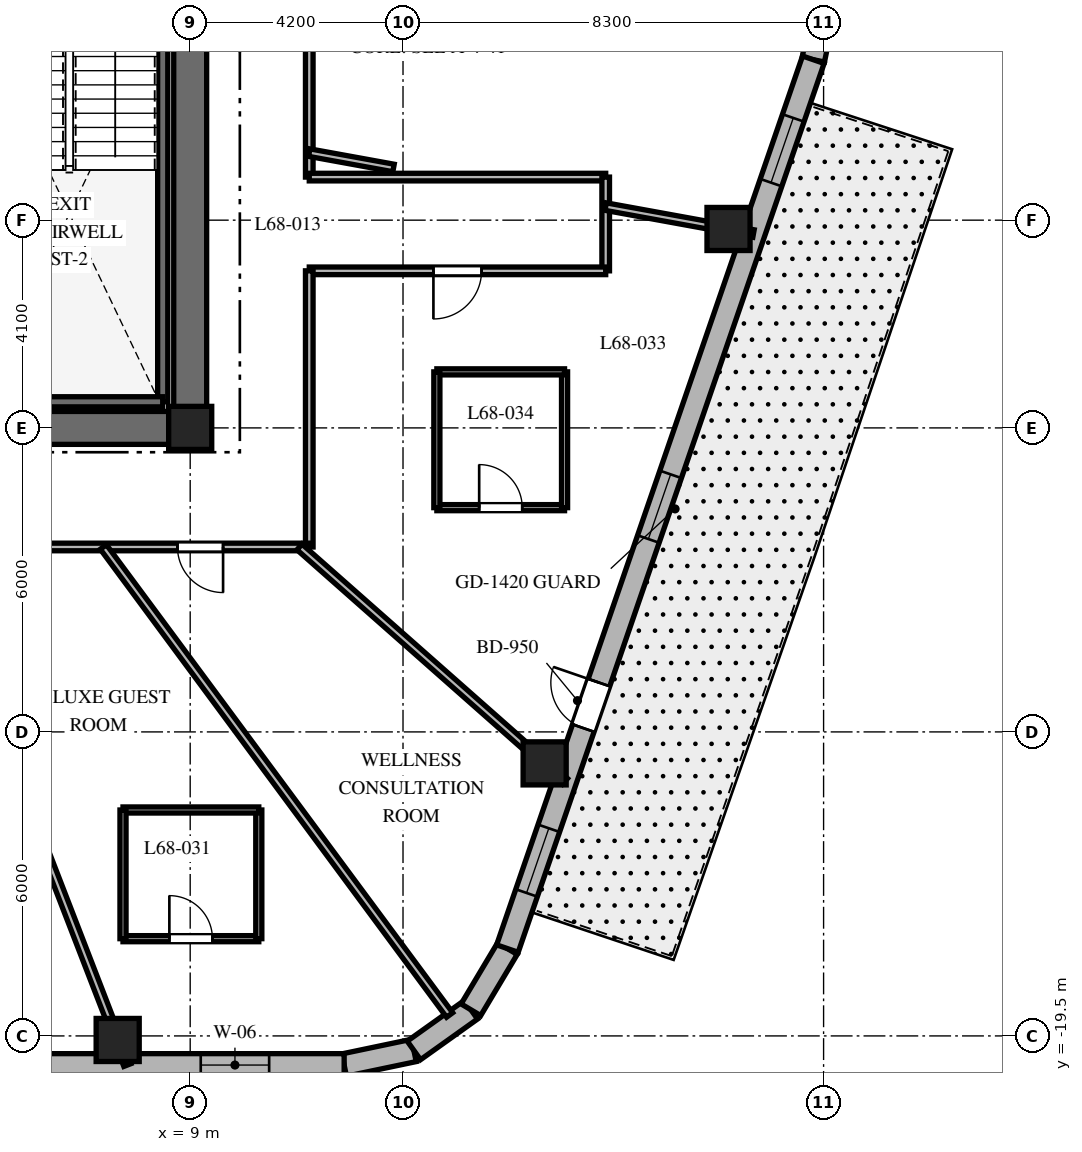
"""IFC4 building model, lengths in metres.
Left out: names, types, materials, properties, quantities, classifications, styles, units other than length and angle.
Written with IfcOpenShell. Run it as: python <this file> out.ifc"""

import sys

from ifc_helpers import new_model, si_unit, direction, frame, frame_2d, origin, origin_2d, place, context, subcontext, project, spatial, rectangle, extrude, element, fill, save


model = new_model("IFC4")
c1 = context("Model", 3, precision=1e-05, world=origin(), true_north=direction((0.0, 1.0)))
c2 = subcontext(c1, "Body", "Model", "MODEL_VIEW")
j1 = project(units=[si_unit("LENGTHUNIT", "METRE"), si_unit("PLANEANGLEUNIT", "RADIAN")], contexts=[c1])
p1 = place(None, origin())
s1 = spatial("IfcSite", under=j1, at=p1, CompositionType="ELEMENT")
p2 = place(p1, origin())
s2 = spatial("IfcBuilding", under=s1, at=p2, CompositionType="ELEMENT")
p3 = place(p2, frame((0.0, 0.0, 273.0)))
s3 = spatial("IfcBuildingStorey", under=s2, at=p3, CompositionType="ELEMENT", Elevation=273.0)
p4 = place(p3, frame((-9.325, -7.5, 0.0), z_axis=(0.0, 0.0, 1.0), x_axis=(1.0, 0.0, 0.0)))
e1 = element("IfcWall", 1, at=p4, inside=s3, PredefinedType="SHEAR", context=c2, shape_type="SweptSolid", body=[
    extrude(rectangle(XDim=18.65, YDim=0.65, at=frame_2d((9.325, 0.0))), origin(), (0.0, 0.0, 1.0), 3.9),
])
p5 = place(p4, frame((9.375, 0.0, 0.0)))
e2 = element("IfcOpeningElement", 2, at=p5, cuts=e1, PredefinedType="OPENING", context=c2, shape_type="SweptSolid", body=[
    extrude(rectangle(XDim=1.0, YDim=2.15, at=frame_2d((0.5, 1.075))), frame((0.0, 0.335, 0.0), z_axis=(0.0, -1.0, 0.0), x_axis=(1.0, 0.0, 0.0)), (0.0, 0.0, 1.0), 0.67),
])
p6 = place(p3, frame((9.0, -7.175, 0.0), z_axis=(0.0, 0.0, 1.0), x_axis=(0.0, 1.0, 0.0)))
e3 = element("IfcWall", 3, at=p6, inside=s3, PredefinedType="SHEAR", context=c2, shape_type="SweptSolid", body=[
    extrude(rectangle(XDim=14.35, YDim=0.65, at=frame_2d((7.175, 0.0))), origin(), (0.0, 0.0, 1.0), 3.9),
])
p7 = place(p6, frame((10.3, 0.0, 0.0)))
e4 = element("IfcOpeningElement", 4, at=p7, cuts=e3, PredefinedType="OPENING", context=c2, shape_type="SweptSolid", body=[
    extrude(rectangle(XDim=1.05, YDim=2.15, at=frame_2d((0.525, 1.075))), frame((0.0, 0.335, 0.0), z_axis=(0.0, -1.0, 0.0), x_axis=(1.0, 0.0, 0.0)), (0.0, 0.0, 1.0), 0.67),
])
p8 = place(p3, frame((8.458, -6.985, 0.0), z_axis=(0.0, 0.0, 1.0), x_axis=(0.0, 1.0, 0.0)))
e5 = element("IfcWall", 5, at=p8, inside=s3, PredefinedType="SHEAR", context=c2, shape_type="SweptSolid", body=[
    extrude(rectangle(XDim=9.143, YDim=0.2, at=frame_2d((4.572, 0.0))), origin(), (0.0, 0.0, 1.0), 3.9),
])
p9 = place(p3, frame((4.772, -6.985, 0.0), z_axis=(0.0, 0.0, 1.0), x_axis=(1.0, 0.0, 0.0)))
e6 = element("IfcWall", 6, at=p9, inside=s3, PredefinedType="SHEAR", context=c2, shape_type="SweptSolid", body=[
    extrude(rectangle(XDim=3.686, YDim=0.2, at=frame_2d((1.843, 0.0))), origin(), (0.0, 0.0, 1.0), 3.9),
])
for number, where, z_axis, x_axis in (
    (7, (9.0, -7.5, 0.0), (0.0, 0.0, 1.0), (1.0, 0.0, 0.0)),
    (8, (7.569, -19.58, 0.0), (0.0, 0.0, 1.0), (1.0, 0.0, 0.0)),
    (9, (15.995, -14.121, 0.0), (0.0, 0.0, 1.0), (1.0, 0.0, 0.0)),
    (10, (19.624, -3.574, 0.0), (0.0, 0.0, 1.0), (1.0, 0.0, 0.0)),
):
    element("IfcColumn", number, at=place(p3, frame(where, z_axis=z_axis, x_axis=x_axis)), inside=s3, PredefinedType="COLUMN", context=c2, shape_type="SweptSolid", body=[
        extrude(rectangle(XDim=0.85, YDim=0.85, at=origin_2d()), origin(), (0.0, 0.0, 1.0), 3.9),
    ])
p10 = place(p3, frame((12.038, -20.075, 0.0), z_axis=(0.0, 0.0, 1.0), x_axis=(0.978750122553, 0.205056571711, 0.0)))
e11 = element("IfcWall", 11, at=p10, inside=s3, PredefinedType="SOLIDWALL", context=c2, shape_type="SweptSolid", body=[
    extrude(rectangle(XDim=1.406, YDim=0.45, at=frame_2d((0.703, 0.0))), origin(), (0.0, 0.0, 1.0), 3.6),
])
p11 = place(p3, frame((13.415, -19.787, 0.0), z_axis=(0.0, 0.0, 1.0), x_axis=(0.814055493997, 0.580787097561, 0.0)))
e12 = element("IfcWall", 12, at=p11, inside=s3, PredefinedType="SOLIDWALL", context=c2, shape_type="SweptSolid", body=[
    extrude(rectangle(XDim=1.383, YDim=0.45, at=frame_2d((0.691, 0.0))), origin(), (0.0, 0.0, 1.0), 3.6),
])
p12 = place(p3, frame((14.54, -18.984, 0.0), z_axis=(0.0, 0.0, 1.0), x_axis=(0.512374906623, 0.858761873317, 0.0)))
e13 = element("IfcWall", 13, at=p12, inside=s3, PredefinedType="SOLIDWALL", context=c2, shape_type="SweptSolid", body=[
    extrude(rectangle(XDim=1.406, YDim=0.45, at=frame_2d((0.703, 0.0))), origin(), (0.0, 0.0, 1.0), 3.6),
])
p13 = place(p3, frame((21.298, -0.233, 0.0), z_axis=(0.0, 0.0, 1.0), x_axis=(0.199158176661, 0.979967356941, 0.0)))
e14 = element("IfcWall", 14, at=p13, inside=s3, PredefinedType="SOLIDWALL", context=c2, shape_type="SweptSolid", body=[
    extrude(rectangle(XDim=0.895, YDim=0.45, at=frame_2d((0.447, 0.0))), origin(), (0.0, 0.0, 1.0), 3.6),
])
p14 = place(p3, frame((-10.379, -20.075, 0.0), z_axis=(0.0, 0.0, 1.0), x_axis=(1.0, 0.0, 0.0)))
e15 = element("IfcWall", 15, at=p14, inside=s3, PredefinedType="SOLIDWALL", context=c2, shape_type="SweptSolid", body=[
    extrude(rectangle(XDim=22.417, YDim=0.45, at=frame_2d((11.208, 0.0))), origin(), (0.0, 0.0, 1.0), 3.6),
])
p15 = place(p14, frame((1.48, 0.0, 0.8)))
e16 = element("IfcOpeningElement", 16, at=p15, cuts=e15, PredefinedType="OPENING", context=c2, shape_type="SweptSolid", body=[
    extrude(rectangle(XDim=1.35, YDim=1.75, at=frame_2d((0.675, 0.875))), frame((0.0, 0.235, 0.0), z_axis=(0.0, -1.0, 0.0), x_axis=(1.0, 0.0, 0.0)), (0.0, 0.0, 1.0), 0.47),
])
p16 = place(p14, frame((10.534, 0.0, 0.8)))
e17 = element("IfcOpeningElement", 17, at=p16, cuts=e15, PredefinedType="OPENING", context=c2, shape_type="SweptSolid", body=[
    extrude(rectangle(XDim=1.35, YDim=1.75, at=frame_2d((0.675, 0.875))), frame((0.0, 0.235, 0.0), z_axis=(0.0, -1.0, 0.0), x_axis=(1.0, 0.0, 0.0)), (0.0, 0.0, 1.0), 0.47),
])
p17 = place(p14, frame((19.587, 0.0, 0.8)))
e18 = element("IfcOpeningElement", 18, at=p17, cuts=e15, PredefinedType="OPENING", context=c2, shape_type="SweptSolid", body=[
    extrude(rectangle(XDim=1.35, YDim=1.75, at=frame_2d((0.675, 0.875))), frame((0.0, 0.235, 0.0), z_axis=(0.0, -1.0, 0.0), x_axis=(1.0, 0.0, 0.0)), (0.0, 0.0, 1.0), 0.47),
])
p18 = place(p3, frame((15.26, -17.776, 0.0), z_axis=(0.0, 0.0, 1.0), x_axis=(0.325407437101, 0.945573899745, 0.0)))
e19 = element("IfcWall", 19, at=p18, inside=s3, PredefinedType="SOLIDWALL", context=c2, shape_type="SweptSolid", body=[
    extrude(rectangle(XDim=18.552, YDim=0.45, at=frame_2d((9.276, 0.0))), origin(), (0.0, 0.0, 1.0), 3.6),
])
p19 = place(p18, frame((4.602, 0.0, 0.0)))
e20 = element("IfcOpeningElement", 20, at=p19, cuts=e19, PredefinedType="OPENING", context=c2, shape_type="SweptSolid", body=[
    extrude(rectangle(XDim=0.95, YDim=2.15, at=frame_2d((0.475, 1.075))), frame((0.0, 0.235, 0.0), z_axis=(0.0, -1.0, 0.0), x_axis=(1.0, 0.0, 0.0)), (0.0, 0.0, 1.0), 0.47),
])
p20 = place(p18, frame((1.161, 0.0, 0.8)))
e21 = element("IfcOpeningElement", 21, at=p20, cuts=e19, PredefinedType="OPENING", context=c2, shape_type="SweptSolid", body=[
    extrude(rectangle(XDim=1.35, YDim=1.75, at=frame_2d((0.675, 0.875))), frame((0.0, 0.235, 0.0), z_axis=(0.0, -1.0, 0.0), x_axis=(1.0, 0.0, 0.0)), (0.0, 0.0, 1.0), 0.47),
])
p21 = place(p18, frame((8.548, 0.0, 0.8)))
e22 = element("IfcOpeningElement", 22, at=p21, cuts=e19, PredefinedType="OPENING", context=c2, shape_type="SweptSolid", body=[
    extrude(rectangle(XDim=1.35, YDim=1.75, at=frame_2d((0.675, 0.875))), frame((0.0, 0.235, 0.0), z_axis=(0.0, -1.0, 0.0), x_axis=(1.0, 0.0, 0.0)), (0.0, 0.0, 1.0), 0.47),
])
p22 = place(p18, frame((15.987, 0.0, 0.8)))
e23 = element("IfcOpeningElement", 23, at=p22, cuts=e19, PredefinedType="OPENING", context=c2, shape_type="SweptSolid", body=[
    extrude(rectangle(XDim=1.35, YDim=1.75, at=frame_2d((0.675, 0.875))), frame((0.0, 0.235, 0.0), z_axis=(0.0, -1.0, 0.0), x_axis=(1.0, 0.0, 0.0)), (0.0, 0.0, 1.0), 0.47),
])
p23 = place(p3, frame((11.35, 9.85, 0.0), z_axis=(0.0, 0.0, 1.0), x_axis=(0.0, -1.0, 0.0)))
e24 = element("IfcWall", 24, at=p23, inside=s3, PredefinedType="PARTITIONING", context=c2, shape_type="SweptSolid", body=[
    extrude(rectangle(XDim=12.4, YDim=0.15, at=frame_2d((6.2, 0.0))), origin(), (0.0, 0.0, 1.0), 3.09),
])
p24 = place(p23, frame((2.998, 0.0, 0.0)))
e25 = element("IfcOpeningElement", 25, at=p24, cuts=e24, PredefinedType="OPENING", context=c2, shape_type="SweptSolid", body=[
    extrude(rectangle(XDim=0.95, YDim=2.03, at=frame_2d((0.475, 1.015))), frame((0.0, 0.085, 0.0), z_axis=(0.0, -1.0, 0.0), x_axis=(1.0, 0.0, 0.0)), (0.0, 0.0, 1.0), 0.17),
])
p25 = place(p23, frame((8.835, 0.0, 0.0)))
e26 = element("IfcOpeningElement", 26, at=p25, cuts=e24, PredefinedType="OPENING", context=c2, shape_type="SweptSolid", body=[
    extrude(rectangle(XDim=0.95, YDim=2.03, at=frame_2d((0.475, 1.015))), frame((0.0, 0.085, 0.0), z_axis=(0.0, -1.0, 0.0), x_axis=(1.0, 0.0, 0.0)), (0.0, 0.0, 1.0), 0.17),
])
p26 = place(p3, frame((11.35, -2.55, 0.0), z_axis=(0.0, 0.0, 1.0), x_axis=(1.0, 0.0, 0.0)))
e27 = element("IfcWall", 27, at=p26, inside=s3, PredefinedType="PARTITIONING", context=c2, shape_type="SweptSolid", body=[
    extrude(rectangle(XDim=5.85, YDim=0.15, at=frame_2d((2.925, 0.0))), origin(), (0.0, 0.0, 1.0), 3.041),
])
p27 = place(p3, frame((17.2, -2.55, 0.0), z_axis=(0.0, 0.0, 1.0), x_axis=(0.0, -1.0, 0.0)))
e28 = element("IfcWall", 28, at=p27, inside=s3, PredefinedType="PARTITIONING", context=c2, shape_type="SweptSolid", body=[
    extrude(rectangle(XDim=1.85, YDim=0.15, at=frame_2d((0.925, 0.0))), origin(), (0.0, 0.0, 1.0), 3.09),
])
p28 = place(p3, frame((17.2, -4.4, 0.0), z_axis=(0.0, 0.0, 1.0), x_axis=(-1.0, 0.0, 0.0)))
e29 = element("IfcWall", 29, at=p28, inside=s3, PredefinedType="PARTITIONING", context=c2, shape_type="SweptSolid", body=[
    extrude(rectangle(XDim=5.85, YDim=0.15, at=frame_2d((2.925, 0.0))), origin(), (0.0, 0.0, 1.0), 3.041),
])
p29 = place(p28, frame((2.45, 0.0, 0.0)))
e30 = element("IfcOpeningElement", 30, at=p29, cuts=e29, PredefinedType="OPENING", context=c2, shape_type="SweptSolid", body=[
    extrude(rectangle(XDim=0.95, YDim=2.03, at=frame_2d((0.475, 1.015))), frame((0.0, 0.085, 0.0), z_axis=(0.0, -1.0, 0.0), x_axis=(1.0, 0.0, 0.0)), (0.0, 0.0, 1.0), 0.17),
])
p30 = place(p3, frame((11.35, -4.4, 0.0), z_axis=(0.0, 0.0, 1.0), x_axis=(0.0, -1.0, 0.0)))
e31 = element("IfcWall", 31, at=p30, inside=s3, PredefinedType="PARTITIONING", context=c2, shape_type="SweptSolid", body=[
    extrude(rectangle(XDim=5.45, YDim=0.15, at=frame_2d((2.725, 0.0))), origin(), (0.0, 0.0, 1.0), 3.09),
])
p31 = place(p3, frame((11.35, -9.85, 0.0), z_axis=(0.0, 0.0, 1.0), x_axis=(-1.0, 0.0, 0.0)))
e32 = element("IfcWall", 32, at=p31, inside=s3, PredefinedType="PARTITIONING", context=c2, shape_type="SweptSolid", body=[
    extrude(rectangle(XDim=10.43, YDim=0.15, at=frame_2d((5.215, 0.0))), origin(), (0.0, 0.0, 1.0), 3.09),
])
p32 = place(p31, frame((8.382, 0.0, 0.0)))
e33 = element("IfcOpeningElement", 33, at=p32, cuts=e32, PredefinedType="OPENING", context=c2, shape_type="SweptSolid", body=[
    extrude(rectangle(XDim=0.95, YDim=2.03, at=frame_2d((0.475, 1.015))), frame((0.0, 0.085, 0.0), z_axis=(0.0, -1.0, 0.0), x_axis=(1.0, 0.0, 0.0)), (0.0, 0.0, 1.0), 0.17),
])
p33 = place(p31, frame((5.298, 0.0, 0.0)))
e34 = element("IfcOpeningElement", 34, at=p33, cuts=e32, PredefinedType="OPENING", context=c2, shape_type="SweptSolid", body=[
    extrude(rectangle(XDim=0.95, YDim=2.03, at=frame_2d((0.475, 1.015))), frame((0.0, 0.085, 0.0), z_axis=(0.0, -1.0, 0.0), x_axis=(1.0, 0.0, 0.0)), (0.0, 0.0, 1.0), 0.17),
])
p34 = place(p31, frame((1.701, 0.0, 0.0)))
e35 = element("IfcOpeningElement", 35, at=p34, cuts=e32, PredefinedType="OPENING", context=c2, shape_type="SweptSolid", body=[
    extrude(rectangle(XDim=0.9, YDim=2.03, at=frame_2d((0.45, 1.015))), frame((0.0, 0.085, 0.0), z_axis=(0.0, -1.0, 0.0), x_axis=(1.0, 0.0, 0.0)), (0.0, 0.0, 1.0), 0.17),
])
p35 = place(p3, frame((3.808, -9.85, 0.0), z_axis=(0.0, 0.0, 1.0), x_axis=(0.360587327934, -0.932725457427, 0.0)))
e36 = element("IfcWall", 36, at=p35, inside=s3, PredefinedType="PARTITIONING", context=c2, shape_type="SweptSolid", body=[
    extrude(rectangle(XDim=10.962, YDim=0.15, at=frame_2d((5.481, 0.0))), origin(), (0.0, 0.0, 1.0), 2.94),
])
p36 = place(p3, frame((7.287, -9.85, 0.0), z_axis=(0.0, 0.0, 1.0), x_axis=(0.594730961824, -0.803924799373, 0.0)))
e37 = element("IfcWall", 37, at=p36, inside=s3, PredefinedType="PARTITIONING", context=c2, shape_type="SweptSolid", body=[
    extrude(rectangle(XDim=11.49, YDim=0.15, at=frame_2d((5.745, 0.0))), origin(), (0.0, 0.0, 1.0), 2.94),
])
p37 = place(p3, frame((11.157, -9.85, 0.0), z_axis=(0.0, 0.0, 1.0), x_axis=(0.74966962095, -0.661812253909, 0.0)))
e38 = element("IfcWall", 38, at=p37, inside=s3, PredefinedType="PARTITIONING", context=c2, shape_type="SweptSolid", body=[
    extrude(rectangle(XDim=6.989, YDim=0.15, at=frame_2d((3.494, 0.0))), origin(), (0.0, 0.0, 1.0), 2.94),
])
p38 = place(p3, frame((11.35, -2.067, 0.0), z_axis=(0.0, 0.0, 1.0), x_axis=(0.983807459651, -0.179228575665, 0.0)))
e39 = element("IfcWall", 39, at=p38, inside=s3, PredefinedType="PARTITIONING", context=c2, shape_type="SweptSolid", body=[
    extrude(rectangle(XDim=1.69, YDim=0.15, at=frame_2d((0.845, 0.0))), origin(), (0.0, 0.0, 1.0), 3.6),
])
p39 = place(p3, frame((17.2, -3.133, 0.0), z_axis=(0.0, 0.0, 1.0), x_axis=(0.983817168797, -0.179175272791, 0.0)))
e40 = element("IfcWall", 40, at=p39, inside=s3, PredefinedType="PARTITIONING", context=c2, shape_type="SweptSolid", body=[
    extrude(rectangle(XDim=2.965, YDim=0.15, at=frame_2d((1.482, 0.0))), origin(), (0.0, 0.0, 1.0), 2.94),
])
p40 = place(p3, frame((7.674, -17.581, 0.0), z_axis=(0.0, 0.0, 1.0), x_axis=(1.0, 0.0, 0.0)))
e41 = element("IfcWall", 41, at=p40, inside=s3, PredefinedType="PARTITIONING", context=c2, shape_type="SweptSolid", body=[
    extrude(rectangle(XDim=2.68, YDim=0.12, at=frame_2d((1.34, 0.0))), origin(), (0.0, 0.0, 1.0), 2.94),
])
p41 = place(p40, frame((0.915, 0.0, 0.0)))
e42 = element("IfcOpeningElement", 42, at=p41, cuts=e41, PredefinedType="OPENING", context=c2, shape_type="SweptSolid", body=[
    extrude(rectangle(XDim=0.85, YDim=2.03, at=frame_2d((0.425, 1.015))), frame((0.0, 0.07, 0.0), z_axis=(0.0, -1.0, 0.0), x_axis=(1.0, 0.0, 0.0)), (0.0, 0.0, 1.0), 0.14),
])
p42 = place(p3, frame((10.354, -17.581, 0.0), z_axis=(0.0, 0.0, 1.0), x_axis=(0.0, 1.0, 0.0)))
e43 = element("IfcWall", 43, at=p42, inside=s3, PredefinedType="PARTITIONING", context=c2, shape_type="SweptSolid", body=[
    extrude(rectangle(XDim=2.54, YDim=0.12, at=frame_2d((1.27, 0.0))), origin(), (0.0, 0.0, 1.0), 2.94),
])
p43 = place(p3, frame((10.354, -15.041, 0.0), z_axis=(0.0, 0.0, 1.0), x_axis=(-1.0, 0.0, 0.0)))
e44 = element("IfcWall", 44, at=p43, inside=s3, PredefinedType="PARTITIONING", context=c2, shape_type="SweptSolid", body=[
    extrude(rectangle(XDim=2.68, YDim=0.12, at=frame_2d((1.34, 0.0))), origin(), (0.0, 0.0, 1.0), 3.09),
])
p44 = place(p3, frame((7.674, -15.041, 0.0), z_axis=(0.0, 0.0, 1.0), x_axis=(0.0, -1.0, 0.0)))
e45 = element("IfcWall", 45, at=p44, inside=s3, PredefinedType="PARTITIONING", context=c2, shape_type="SweptSolid", body=[
    extrude(rectangle(XDim=2.54, YDim=0.12, at=frame_2d((1.27, 0.0))), origin(), (0.0, 0.0, 1.0), 3.041),
])
p45 = place(p3, frame((13.868, -9.074, 0.0), z_axis=(0.0, 0.0, 1.0), x_axis=(1.0, 0.0, 0.0)))
e46 = element("IfcWall", 46, at=p45, inside=s3, PredefinedType="PARTITIONING", context=c2, shape_type="SweptSolid", body=[
    extrude(rectangle(XDim=2.52, YDim=0.12, at=frame_2d((1.26, 0.0))), origin(), (0.0, 0.0, 1.0), 3.172),
])
p46 = place(p45, frame((0.835, 0.0, 0.0)))
e47 = element("IfcOpeningElement", 47, at=p46, cuts=e46, PredefinedType="OPENING", context=c2, shape_type="SweptSolid", body=[
    extrude(rectangle(XDim=0.85, YDim=2.03, at=frame_2d((0.425, 1.015))), frame((0.0, 0.07, 0.0), z_axis=(0.0, -1.0, 0.0), x_axis=(1.0, 0.0, 0.0)), (0.0, 0.0, 1.0), 0.14),
])
p47 = place(p3, frame((16.388, -9.074, 0.0), z_axis=(0.0, 0.0, 1.0), x_axis=(0.0, 1.0, 0.0)))
e48 = element("IfcWall", 48, at=p47, inside=s3, PredefinedType="PARTITIONING", context=c2, shape_type="SweptSolid", body=[
    extrude(rectangle(XDim=2.68, YDim=0.12, at=frame_2d((1.34, 0.0))), origin(), (0.0, 0.0, 1.0), 3.6),
])
p48 = place(p3, frame((16.388, -6.394, 0.0), z_axis=(0.0, 0.0, 1.0), x_axis=(-1.0, 0.0, 0.0)))
e49 = element("IfcWall", 49, at=p48, inside=s3, PredefinedType="PARTITIONING", context=c2, shape_type="SweptSolid", body=[
    extrude(rectangle(XDim=2.52, YDim=0.12, at=frame_2d((1.26, 0.0))), origin(), (0.0, 0.0, 1.0), 3.172),
])
p49 = place(p3, frame((13.868, -6.394, 0.0), z_axis=(0.0, 0.0, 1.0), x_axis=(0.0, -1.0, 0.0)))
e50 = element("IfcWall", 50, at=p49, inside=s3, PredefinedType="PARTITIONING", context=c2, shape_type="SweptSolid", body=[
    extrude(rectangle(XDim=2.68, YDim=0.12, at=frame_2d((1.34, 0.0))), origin(), (0.0, 0.0, 1.0), 3.6),
])
p50 = place(p17, origin())
e51 = element("IfcWindow", 51, at=p50, inside=s3, PartitioningType="SINGLE_PANEL", PredefinedType="WINDOW", context=c2, shape_type="SweptSolid", body=[
    extrude(rectangle(XDim=1.35, YDim=1.75, at=frame_2d((0.675, 0.875))), frame((0.0, 0.03, 0.0), z_axis=(0.0, -1.0, 0.0), x_axis=(1.0, 0.0, 0.0)), (0.0, 0.0, 1.0), 0.06),
])
fill(e18, e51)
p51 = place(p19, origin())
e52 = element("IfcDoor", 52, at=p51, inside=s3, OperationType="SINGLE_SWING_RIGHT", PredefinedType="DOOR", context=c2, shape_type="SweptSolid", body=[
    extrude(rectangle(XDim=0.95, YDim=2.15, at=frame_2d((0.475, 1.075))), frame((0.0, 0.025, 0.0), z_axis=(0.0, -1.0, 0.0), x_axis=(1.0, 0.0, 0.0)), (0.0, 0.0, 1.0), 0.05),
])
fill(e20, e52)
p52 = place(p20, origin())
e53 = element("IfcWindow", 53, at=p52, inside=s3, PartitioningType="SINGLE_PANEL", PredefinedType="WINDOW", context=c2, shape_type="SweptSolid", body=[
    extrude(rectangle(XDim=1.35, YDim=1.75, at=frame_2d((0.675, 0.875))), frame((0.0, 0.03, 0.0), z_axis=(0.0, -1.0, 0.0), x_axis=(1.0, 0.0, 0.0)), (0.0, 0.0, 1.0), 0.06),
])
fill(e21, e53)
p53 = place(p21, origin())
e54 = element("IfcWindow", 54, at=p53, inside=s3, PartitioningType="SINGLE_PANEL", PredefinedType="WINDOW", context=c2, shape_type="SweptSolid", body=[
    extrude(rectangle(XDim=1.35, YDim=1.75, at=frame_2d((0.675, 0.875))), frame((0.0, 0.03, 0.0), z_axis=(0.0, -1.0, 0.0), x_axis=(1.0, 0.0, 0.0)), (0.0, 0.0, 1.0), 0.06),
])
fill(e22, e54)
p54 = place(p22, origin())
e55 = element("IfcWindow", 55, at=p54, inside=s3, PartitioningType="SINGLE_PANEL", PredefinedType="WINDOW", context=c2, shape_type="SweptSolid", body=[
    extrude(rectangle(XDim=1.35, YDim=1.75, at=frame_2d((0.675, 0.875))), frame((0.0, 0.03, 0.0), z_axis=(0.0, -1.0, 0.0), x_axis=(1.0, 0.0, 0.0)), (0.0, 0.0, 1.0), 0.06),
])
fill(e23, e55)
p55 = place(p41, origin())
e56 = element("IfcDoor", 56, at=p55, inside=s3, OperationType="SINGLE_SWING_LEFT", PredefinedType="DOOR", context=c2, shape_type="SweptSolid", body=[
    extrude(rectangle(XDim=0.85, YDim=2.03, at=frame_2d((0.425, 1.015))), frame((0.0, 0.025, 0.0), z_axis=(0.0, -1.0, 0.0), x_axis=(1.0, 0.0, 0.0)), (0.0, 0.0, 1.0), 0.05),
])
fill(e42, e56)
p56 = place(p34, origin())
e57 = element("IfcDoor", 57, at=p56, inside=s3, OperationType="SINGLE_SWING_LEFT", PredefinedType="DOOR", context=c2, shape_type="SweptSolid", body=[
    extrude(rectangle(XDim=0.9, YDim=2.03, at=frame_2d((0.45, 1.015))), frame((0.0, 0.025, 0.0), z_axis=(0.0, -1.0, 0.0), x_axis=(1.0, 0.0, 0.0)), (0.0, 0.0, 1.0), 0.05),
])
fill(e35, e57)
p57 = place(p29, origin())
e58 = element("IfcDoor", 58, at=p57, inside=s3, OperationType="SINGLE_SWING_RIGHT", PredefinedType="DOOR", context=c2, shape_type="SweptSolid", body=[
    extrude(rectangle(XDim=0.95, YDim=2.03, at=frame_2d((0.475, 1.015))), frame((0.0, 0.025, 0.0), z_axis=(0.0, -1.0, 0.0), x_axis=(1.0, 0.0, 0.0)), (0.0, 0.0, 1.0), 0.05),
])
fill(e30, e58)
p58 = place(p46, origin())
e59 = element("IfcDoor", 59, at=p58, inside=s3, OperationType="SINGLE_SWING_LEFT", PredefinedType="DOOR", context=c2, shape_type="SweptSolid", body=[
    extrude(rectangle(XDim=0.85, YDim=2.03, at=frame_2d((0.425, 1.015))), frame((0.0, 0.025, 0.0), z_axis=(0.0, -1.0, 0.0), x_axis=(1.0, 0.0, 0.0)), (0.0, 0.0, 1.0), 0.05),
])
fill(e47, e59)
save(model, sys.argv[1])
